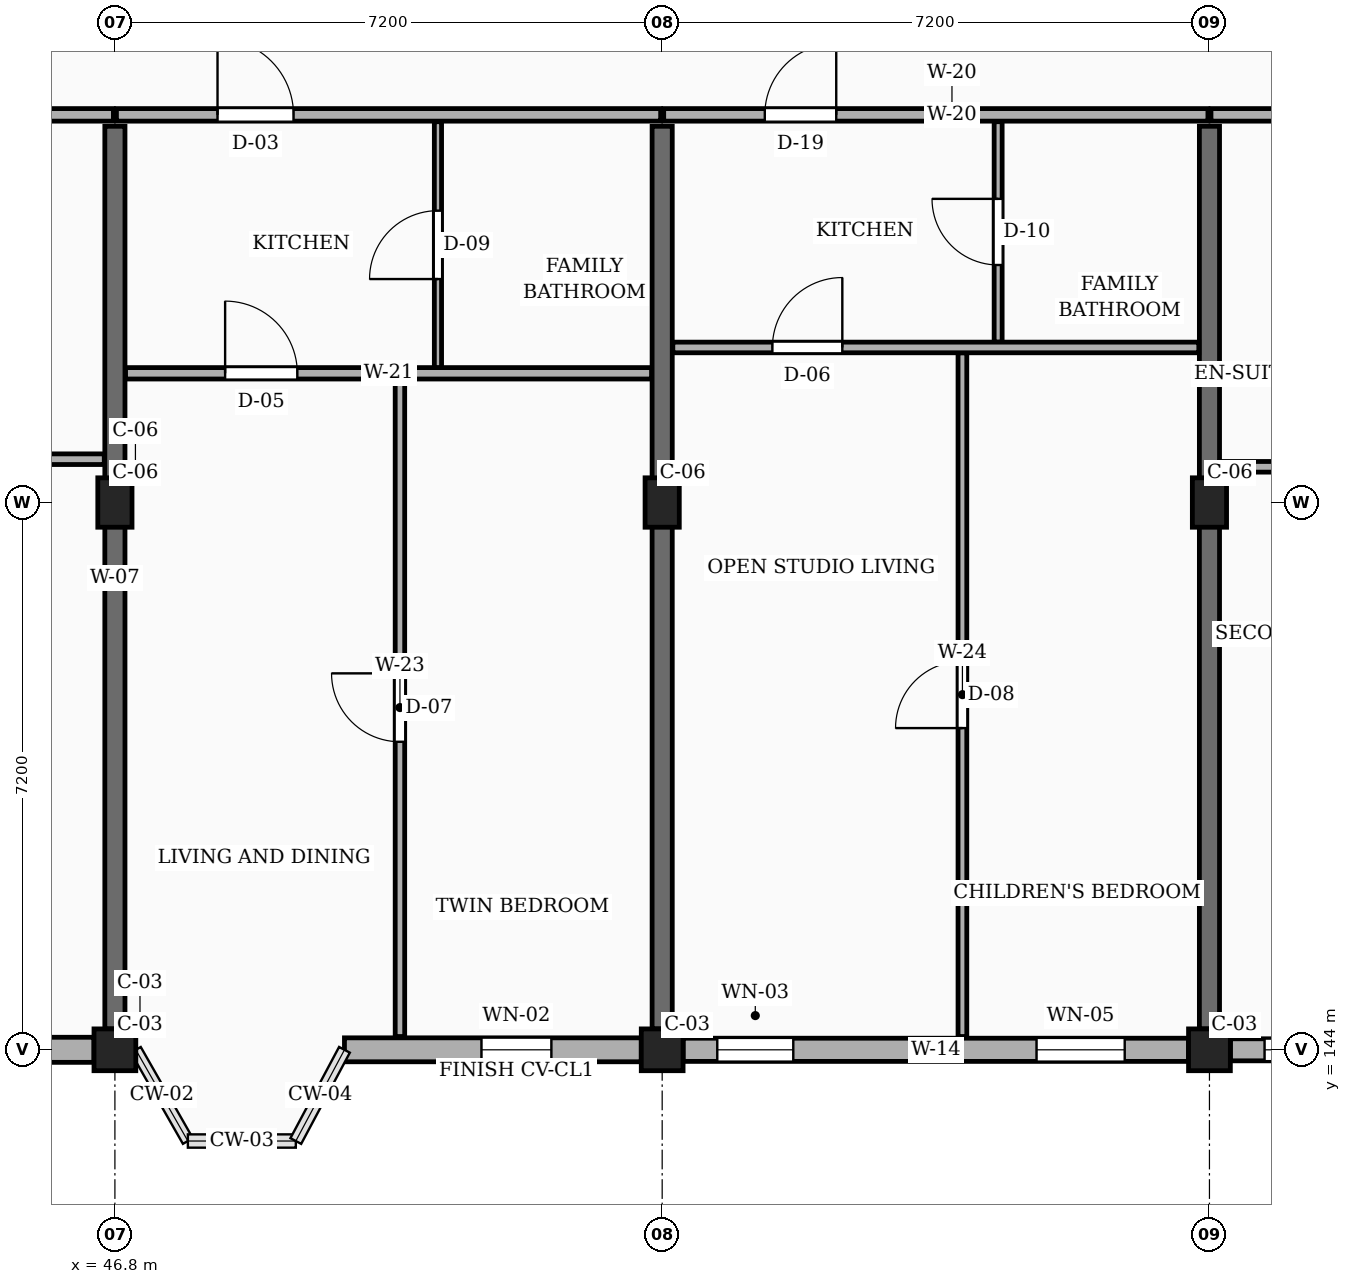
"""IFC4 building model, lengths in metres.
Left out: names, types, materials, properties, quantities, classifications, styles, units other than length and angle.
Written with IfcOpenShell. Run it as: python <this file> out.ifc"""

import sys

from ifc_helpers import new_model, si_unit, direction, frame, frame_2d, origin, origin_2d, place, context, subcontext, project, spatial, rectangle, extrude, element, fill, save


model = new_model("IFC4")
c1 = context("Model", 3, precision=1e-05, world=origin(), true_north=direction((0.0, 1.0)))
c2 = subcontext(c1, "Body", "Model", "MODEL_VIEW")
j1 = project(units=[si_unit("LENGTHUNIT", "METRE"), si_unit("PLANEANGLEUNIT", "RADIAN")], contexts=[c1])
p1 = place(None, origin())
s1 = spatial("IfcSite", under=j1, at=p1, CompositionType="ELEMENT")
p2 = place(p1, origin())
s2 = spatial("IfcBuilding", under=s1, at=p2, CompositionType="ELEMENT")
p3 = place(p2, frame((0.0, 0.0, 10.8)))
s3 = spatial("IfcBuildingStorey", under=s2, at=p3, CompositionType="ELEMENT", Elevation=10.8)
p4 = place(p3, frame((46.8, 144.0, 0.0), z_axis=(0.0, 0.0, 1.0), x_axis=(1.0, 0.0, 0.0)))
e1 = element("IfcColumn", 1, at=p4, inside=s3, PredefinedType="COLUMN", context=c2, shape_type="SweptSolid", body=[
    extrude(rectangle(XDim=0.55, YDim=0.55, at=origin_2d()), origin(), (0.0, 0.0, 1.0), 3.15),
])
p5 = place(p3, frame((46.8, 151.2, 0.0), z_axis=(0.0, 0.0, 1.0), x_axis=(1.0, 0.0, 0.0)))
e2 = element("IfcColumn", 2, at=p5, inside=s3, PredefinedType="COLUMN", context=c2, shape_type="SweptSolid", body=[
    extrude(rectangle(XDim=0.45, YDim=0.65, at=origin_2d()), origin(), (0.0, 0.0, 1.0), 3.15),
])
p6 = place(p3, frame((54.0, 144.0, 0.0), z_axis=(0.0, 0.0, 1.0), x_axis=(1.0, 0.0, 0.0)))
e3 = element("IfcColumn", 3, at=p6, inside=s3, PredefinedType="COLUMN", context=c2, shape_type="SweptSolid", body=[
    extrude(rectangle(XDim=0.55, YDim=0.55, at=origin_2d()), origin(), (0.0, 0.0, 1.0), 3.15),
])
p7 = place(p3, frame((54.0, 151.2, 0.0), z_axis=(0.0, 0.0, 1.0), x_axis=(1.0, 0.0, 0.0)))
e4 = element("IfcColumn", 4, at=p7, inside=s3, PredefinedType="COLUMN", context=c2, shape_type="SweptSolid", body=[
    extrude(rectangle(XDim=0.45, YDim=0.65, at=origin_2d()), origin(), (0.0, 0.0, 1.0), 3.15),
])
p8 = place(p3, frame((61.2, 144.0, 0.0), z_axis=(0.0, 0.0, 1.0), x_axis=(1.0, 0.0, 0.0)))
e5 = element("IfcColumn", 5, at=p8, inside=s3, PredefinedType="COLUMN", context=c2, shape_type="SweptSolid", body=[
    extrude(rectangle(XDim=0.55, YDim=0.55, at=origin_2d()), origin(), (0.0, 0.0, 1.0), 3.15),
])
p9 = place(p3, frame((61.2, 151.2, 0.0), z_axis=(0.0, 0.0, 1.0), x_axis=(1.0, 0.0, 0.0)))
e6 = element("IfcColumn", 6, at=p9, inside=s3, PredefinedType="COLUMN", context=c2, shape_type="SweptSolid", body=[
    extrude(rectangle(XDim=0.45, YDim=0.65, at=origin_2d()), origin(), (0.0, 0.0, 1.0), 3.15),
])
for number, where, z_axis, x_axis in (
    (7, (46.8, 144.275, 0.0), (0.0, 0.0, 1.0), (0.0, 1.0, 0.0)),
    (8, (54.0, 144.275, 0.0), (0.0, 0.0, 1.0), (0.0, 1.0, 0.0)),
    (9, (61.2, 144.275, 0.0), (0.0, 0.0, 1.0), (0.0, 1.0, 0.0)),
):
    element("IfcWall", number, at=place(p3, frame(where, z_axis=z_axis, x_axis=x_axis)), inside=s3, PredefinedType="SOLIDWALL", context=c2, shape_type="SweptSolid", body=[
        extrude(rectangle(XDim=11.875, YDim=0.265, at=frame_2d((5.938, 0.0))), origin(), (0.0, 0.0, 1.0), 2.185),
    ])
p10 = place(p3, frame((39.875, 144.0, 0.0), z_axis=(0.0, 0.0, 1.0), x_axis=(1.0, 0.0, 0.0)))
e10 = element("IfcWall", 10, at=p10, inside=s3, PredefinedType="SOLIDWALL", context=c2, shape_type="SweptSolid", body=[
    extrude(rectangle(XDim=6.65, YDim=0.33, at=frame_2d((3.325, 0.0))), origin(), (0.0, 0.0, 1.0), 2.455),
])
p11 = place(p10, frame((0.45, 0.0, 0.78)))
e11 = element("IfcOpeningElement", 11, at=p11, cuts=e10, PredefinedType="OPENING", context=c2, shape_type="SweptSolid", body=[
    extrude(rectangle(XDim=1.45, YDim=1.44, at=frame_2d((0.725, 0.72))), frame((0.0, 0.175, 0.0), z_axis=(0.0, -1.0, 0.0), x_axis=(1.0, 0.0, 0.0)), (0.0, 0.0, 1.0), 0.35),
])
p12 = place(p10, frame((4.65, 0.0, 0.78)))
e12 = element("IfcOpeningElement", 12, at=p12, cuts=e10, PredefinedType="OPENING", context=c2, shape_type="SweptSolid", body=[
    extrude(rectangle(XDim=0.92, YDim=1.15, at=frame_2d((0.46, 0.575))), frame((0.0, 0.175, 0.0), z_axis=(0.0, -1.0, 0.0), x_axis=(1.0, 0.0, 0.0)), (0.0, 0.0, 1.0), 0.35),
])
p13 = place(p3, frame((49.82, 144.0, 0.0), z_axis=(0.0, 0.0, 1.0), x_axis=(1.0, 0.0, 0.0)))
e13 = element("IfcWall", 13, at=p13, inside=s3, PredefinedType="SOLIDWALL", context=c2, shape_type="SweptSolid", body=[
    extrude(rectangle(XDim=3.905, YDim=0.315, at=frame_2d((1.953, 0.0))), origin(), (0.0, 0.0, 1.0), 2.455),
])
p14 = place(p13, frame((1.802, 0.0, 0.78)))
e14 = element("IfcOpeningElement", 14, at=p14, cuts=e13, PredefinedType="OPENING", context=c2, shape_type="SweptSolid", body=[
    extrude(rectangle(XDim=0.92, YDim=1.15, at=frame_2d((0.46, 0.575))), frame((0.0, 0.167, 0.0), z_axis=(0.0, -1.0, 0.0), x_axis=(1.0, 0.0, 0.0)), (0.0, 0.0, 1.0), 0.335),
])
p15 = place(p3, frame((54.275, 144.0, 0.0), z_axis=(0.0, 0.0, 1.0), x_axis=(1.0, 0.0, 0.0)))
e15 = element("IfcWall", 15, at=p15, inside=s3, PredefinedType="SOLIDWALL", context=c2, shape_type="SweptSolid", body=[
    extrude(rectangle(XDim=6.65, YDim=0.305, at=frame_2d((3.325, 0.0))), origin(), (0.0, 0.0, 1.0), 2.455),
])
p16 = place(p15, frame((0.45, 0.0, 0.78)))
e16 = element("IfcOpeningElement", 16, at=p16, cuts=e15, PredefinedType="OPENING", context=c2, shape_type="SweptSolid", body=[
    extrude(rectangle(XDim=1.0, YDim=1.15, at=frame_2d((0.5, 0.575))), frame((0.0, 0.163, 0.0), z_axis=(0.0, -1.0, 0.0), x_axis=(1.0, 0.0, 0.0)), (0.0, 0.0, 1.0), 0.325),
])
p17 = place(p15, frame((4.65, 0.0, 0.78)))
e17 = element("IfcOpeningElement", 17, at=p17, cuts=e15, PredefinedType="OPENING", context=c2, shape_type="SweptSolid", body=[
    extrude(rectangle(XDim=1.16, YDim=1.15, at=frame_2d((0.58, 0.575))), frame((0.0, 0.163, 0.0), z_axis=(0.0, -1.0, 0.0), x_axis=(1.0, 0.0, 0.0)), (0.0, 0.0, 1.0), 0.325),
])
p18 = place(p3, frame((61.475, 144.0, 0.0), z_axis=(0.0, 0.0, 1.0), x_axis=(1.0, 0.0, 0.0)))
e18 = element("IfcWall", 18, at=p18, inside=s3, PredefinedType="SOLIDWALL", context=c2, shape_type="SweptSolid", body=[
    extrude(rectangle(XDim=6.65, YDim=0.29, at=frame_2d((3.325, 0.0))), origin(), (0.0, 0.0, 1.0), 2.455),
])
p19 = place(p18, frame((0.45, 0.0, 0.78)))
e19 = element("IfcOpeningElement", 19, at=p19, cuts=e18, PredefinedType="OPENING", context=c2, shape_type="SweptSolid", body=[
    extrude(rectangle(XDim=1.16, YDim=1.15, at=frame_2d((0.58, 0.575))), frame((0.0, 0.155, 0.0), z_axis=(0.0, -1.0, 0.0), x_axis=(1.0, 0.0, 0.0)), (0.0, 0.0, 1.0), 0.31),
])
p20 = place(p18, frame((4.65, 0.0, 0.78)))
e20 = element("IfcOpeningElement", 20, at=p20, cuts=e18, PredefinedType="OPENING", context=c2, shape_type="SweptSolid", body=[
    extrude(rectangle(XDim=1.32, YDim=1.15, at=frame_2d((0.66, 0.575))), frame((0.0, 0.155, 0.0), z_axis=(0.0, -1.0, 0.0), x_axis=(1.0, 0.0, 0.0)), (0.0, 0.0, 1.0), 0.31),
])
p21 = place(p3, frame((39.62, 156.3, 0.0), z_axis=(0.0, 0.0, 1.0), x_axis=(1.0, 0.0, 0.0)))
e21 = element("IfcWall", 21, at=p21, inside=s3, PredefinedType="PARTITIONING", context=c2, shape_type="SweptSolid", body=[
    extrude(rectangle(XDim=7.16, YDim=0.165, at=frame_2d((3.58, 0.0))), origin(), (0.0, 0.0, 1.0), 2.32),
])
p22 = place(p21, frame((4.78, 0.0, 0.0)))
e22 = element("IfcOpeningElement", 22, at=p22, cuts=e21, PredefinedType="OPENING", context=c2, shape_type="SweptSolid", body=[
    extrude(rectangle(XDim=1.14, YDim=2.18, at=frame_2d((0.57, 1.09))), frame((0.0, 0.093, 0.0), z_axis=(0.0, -1.0, 0.0), x_axis=(1.0, 0.0, 0.0)), (0.0, 0.0, 1.0), 0.185),
])
p23 = place(p3, frame((46.82, 156.3, 0.0), z_axis=(0.0, 0.0, 1.0), x_axis=(1.0, 0.0, 0.0)))
e23 = element("IfcWall", 23, at=p23, inside=s3, PredefinedType="PARTITIONING", context=c2, shape_type="SweptSolid", body=[
    extrude(rectangle(XDim=7.16, YDim=0.165, at=frame_2d((3.58, 0.0))), origin(), (0.0, 0.0, 1.0), 2.32),
])
p24 = place(p23, frame((1.33, 0.0, 0.0)))
e24 = element("IfcOpeningElement", 24, at=p24, cuts=e23, PredefinedType="OPENING", context=c2, shape_type="SweptSolid", body=[
    extrude(rectangle(XDim=1.0, YDim=2.15, at=frame_2d((0.5, 1.075))), frame((0.0, 0.093, 0.0), z_axis=(0.0, -1.0, 0.0), x_axis=(1.0, 0.0, 0.0)), (0.0, 0.0, 1.0), 0.185),
])
p25 = place(p3, frame((54.02, 156.3, 0.0), z_axis=(0.0, 0.0, 1.0), x_axis=(1.0, 0.0, 0.0)))
e25 = element("IfcWall", 25, at=p25, inside=s3, PredefinedType="PARTITIONING", context=c2, shape_type="SweptSolid", body=[
    extrude(rectangle(XDim=7.16, YDim=0.165, at=frame_2d((3.58, 0.0))), origin(), (0.0, 0.0, 1.0), 2.32),
])
p26 = place(p25, frame((1.33, 0.0, 0.0)))
e26 = element("IfcOpeningElement", 26, at=p26, cuts=e25, PredefinedType="OPENING", context=c2, shape_type="SweptSolid", body=[
    extrude(rectangle(XDim=0.94, YDim=2.12, at=frame_2d((0.47, 1.06))), frame((0.0, 0.093, 0.0), z_axis=(0.0, -1.0, 0.0), x_axis=(1.0, 0.0, 0.0)), (0.0, 0.0, 1.0), 0.185),
])
p27 = place(p3, frame((61.22, 156.3, 0.0), z_axis=(0.0, 0.0, 1.0), x_axis=(1.0, 0.0, 0.0)))
e27 = element("IfcWall", 27, at=p27, inside=s3, PredefinedType="PARTITIONING", context=c2, shape_type="SweptSolid", body=[
    extrude(rectangle(XDim=7.16, YDim=0.165, at=frame_2d((3.58, 0.0))), origin(), (0.0, 0.0, 1.0), 2.32),
])
p28 = place(p27, frame((4.78, 0.0, 0.0)))
e28 = element("IfcOpeningElement", 28, at=p28, cuts=e27, PredefinedType="OPENING", context=c2, shape_type="SweptSolid", body=[
    extrude(rectangle(XDim=1.14, YDim=2.18, at=frame_2d((0.57, 1.09))), frame((0.0, 0.093, 0.0), z_axis=(0.0, -1.0, 0.0), x_axis=(1.0, 0.0, 0.0)), (0.0, 0.0, 1.0), 0.185),
])
p29 = place(p3, frame((39.74, 151.77, 0.0), z_axis=(0.0, 0.0, 1.0), x_axis=(1.0, 0.0, 0.0)))
e29 = element("IfcWall", 29, at=p29, inside=s3, PredefinedType="PARTITIONING", context=c2, shape_type="SweptSolid", body=[
    extrude(rectangle(XDim=6.92, YDim=0.14, at=frame_2d((3.46, 0.0))), origin(), (0.0, 0.0, 1.0), 2.32),
])
p30 = place(p29, frame((4.66, 0.0, 0.0)))
e30 = element("IfcOpeningElement", 30, at=p30, cuts=e29, PredefinedType="OPENING", context=c2, shape_type="SweptSolid", body=[
    extrude(rectangle(XDim=0.92, YDim=2.1, at=frame_2d((0.46, 1.05))), frame((0.0, 0.08, 0.0), z_axis=(0.0, -1.0, 0.0), x_axis=(1.0, 0.0, 0.0)), (0.0, 0.0, 1.0), 0.16),
])
p31 = place(p3, frame((50.55, 144.175, 0.0), z_axis=(0.0, 0.0, 1.0), x_axis=(0.0, 1.0, 0.0)))
e31 = element("IfcWall", 31, at=p31, inside=s3, PredefinedType="PARTITIONING", context=c2, shape_type="SweptSolid", body=[
    extrude(rectangle(XDim=8.655, YDim=0.125, at=frame_2d((4.328, 0.0))), origin(), (0.0, 0.0, 1.0), 2.32),
])
p32 = place(p31, frame((3.877, 0.0, 0.0)))
e32 = element("IfcOpeningElement", 32, at=p32, cuts=e31, PredefinedType="OPENING", context=c2, shape_type="SweptSolid", body=[
    extrude(rectangle(XDim=0.9, YDim=2.1, at=frame_2d((0.45, 1.05))), frame((0.0, 0.073, 0.0), z_axis=(0.0, -1.0, 0.0), x_axis=(1.0, 0.0, 0.0)), (0.0, 0.0, 1.0), 0.145),
])
p33 = place(p3, frame((51.05, 152.97, 0.0), z_axis=(0.0, 0.0, 1.0), x_axis=(0.0, 1.0, 0.0)))
e33 = element("IfcWall", 33, at=p33, inside=s3, PredefinedType="PARTITIONING", context=c2, shape_type="SweptSolid", body=[
    extrude(rectangle(XDim=3.24, YDim=0.095, at=frame_2d((1.62, 0.0))), origin(), (0.0, 0.0, 1.0), 2.32),
])
p34 = place(p33, frame((1.17, 0.0, 0.0)))
e34 = element("IfcOpeningElement", 34, at=p34, cuts=e33, PredefinedType="OPENING", context=c2, shape_type="SweptSolid", body=[
    extrude(rectangle(XDim=0.9, YDim=2.05, at=frame_2d((0.45, 1.025))), frame((0.0, 0.058, 0.0), z_axis=(0.0, -1.0, 0.0), x_axis=(1.0, 0.0, 0.0)), (0.0, 0.0, 1.0), 0.115),
])
p35 = place(p3, frame((46.94, 152.9, 0.0), z_axis=(0.0, 0.0, 1.0), x_axis=(1.0, 0.0, 0.0)))
e35 = element("IfcWall", 35, at=p35, inside=s3, PredefinedType="PARTITIONING", context=c2, shape_type="SweptSolid", body=[
    extrude(rectangle(XDim=6.92, YDim=0.15, at=frame_2d((3.46, 0.0))), origin(), (0.0, 0.0, 1.0), 2.32),
])
p36 = place(p35, frame((1.31, 0.0, 0.0)))
e36 = element("IfcOpeningElement", 36, at=p36, cuts=e35, PredefinedType="OPENING", context=c2, shape_type="SweptSolid", body=[
    extrude(rectangle(XDim=0.95, YDim=2.1, at=frame_2d((0.475, 1.05))), frame((0.0, 0.085, 0.0), z_axis=(0.0, -1.0, 0.0), x_axis=(1.0, 0.0, 0.0)), (0.0, 0.0, 1.0), 0.17),
])
p37 = place(p3, frame((57.95, 144.175, 0.0), z_axis=(0.0, 0.0, 1.0), x_axis=(0.0, 1.0, 0.0)))
e37 = element("IfcWall", 37, at=p37, inside=s3, PredefinedType="PARTITIONING", context=c2, shape_type="SweptSolid", body=[
    extrude(rectangle(XDim=8.995, YDim=0.115, at=frame_2d((4.498, 0.0))), origin(), (0.0, 0.0, 1.0), 2.32),
])
p38 = place(p37, frame((4.058, 0.0, 0.0)))
e38 = element("IfcOpeningElement", 38, at=p38, cuts=e37, PredefinedType="OPENING", context=c2, shape_type="SweptSolid", body=[
    extrude(rectangle(XDim=0.88, YDim=2.08, at=frame_2d((0.44, 1.04))), frame((0.0, 0.067, 0.0), z_axis=(0.0, -1.0, 0.0), x_axis=(1.0, 0.0, 0.0)), (0.0, 0.0, 1.0), 0.135),
])
p39 = place(p3, frame((58.42, 153.31, 0.0), z_axis=(0.0, 0.0, 1.0), x_axis=(0.0, 1.0, 0.0)))
e39 = element("IfcWall", 39, at=p39, inside=s3, PredefinedType="PARTITIONING", context=c2, shape_type="SweptSolid", body=[
    extrude(rectangle(XDim=2.9, YDim=0.105, at=frame_2d((1.45, 0.0))), origin(), (0.0, 0.0, 1.0), 2.32),
])
p40 = place(p39, frame((1.015, 0.0, 0.0)))
e40 = element("IfcOpeningElement", 40, at=p40, cuts=e39, PredefinedType="OPENING", context=c2, shape_type="SweptSolid", body=[
    extrude(rectangle(XDim=0.87, YDim=2.05, at=frame_2d((0.435, 1.025))), frame((0.0, 0.062, 0.0), z_axis=(0.0, -1.0, 0.0), x_axis=(1.0, 0.0, 0.0)), (0.0, 0.0, 1.0), 0.125),
])
p41 = place(p3, frame((54.14, 153.24, 0.0), z_axis=(0.0, 0.0, 1.0), x_axis=(1.0, 0.0, 0.0)))
e41 = element("IfcWall", 41, at=p41, inside=s3, PredefinedType="PARTITIONING", context=c2, shape_type="SweptSolid", body=[
    extrude(rectangle(XDim=6.92, YDim=0.14, at=frame_2d((3.46, 0.0))), origin(), (0.0, 0.0, 1.0), 2.32),
])
p42 = place(p41, frame((1.31, 0.0, 0.0)))
e42 = element("IfcOpeningElement", 42, at=p42, cuts=e41, PredefinedType="OPENING", context=c2, shape_type="SweptSolid", body=[
    extrude(rectangle(XDim=0.92, YDim=2.1, at=frame_2d((0.46, 1.05))), frame((0.0, 0.08, 0.0), z_axis=(0.0, -1.0, 0.0), x_axis=(1.0, 0.0, 0.0)), (0.0, 0.0, 1.0), 0.16),
])
p43 = place(p3, frame((61.34, 151.67, 0.0), z_axis=(0.0, 0.0, 1.0), x_axis=(1.0, 0.0, 0.0)))
e43 = element("IfcWall", 43, at=p43, inside=s3, PredefinedType="PARTITIONING", context=c2, shape_type="SweptSolid", body=[
    extrude(rectangle(XDim=6.92, YDim=0.14, at=frame_2d((3.46, 0.0))), origin(), (0.0, 0.0, 1.0), 2.32),
])
p44 = place(p43, frame((4.66, 0.0, 0.0)))
e44 = element("IfcOpeningElement", 44, at=p44, cuts=e43, PredefinedType="OPENING", context=c2, shape_type="SweptSolid", body=[
    extrude(rectangle(XDim=0.95, YDim=2.1, at=frame_2d((0.475, 1.05))), frame((0.0, 0.08, 0.0), z_axis=(0.0, -1.0, 0.0), x_axis=(1.0, 0.0, 0.0)), (0.0, 0.0, 1.0), 0.16),
])
p45 = place(p14, origin())
e45 = element("IfcWindow", 45, at=p45, inside=s3, PartitioningType="SINGLE_PANEL", PredefinedType="WINDOW", context=c2, shape_type="SweptSolid", body=[
    extrude(rectangle(XDim=0.92, YDim=1.15, at=frame_2d((0.46, 0.575))), frame((0.0, 0.03, 0.0), z_axis=(0.0, -1.0, 0.0), x_axis=(1.0, 0.0, 0.0)), (0.0, 0.0, 1.0), 0.06),
])
fill(e14, e45)
p46 = place(p16, origin())
e46 = element("IfcWindow", 46, at=p46, inside=s3, PartitioningType="SINGLE_PANEL", PredefinedType="WINDOW", context=c2, shape_type="SweptSolid", body=[
    extrude(rectangle(XDim=1.0, YDim=1.15, at=frame_2d((0.5, 0.575))), frame((0.0, 0.03, 0.0), z_axis=(0.0, -1.0, 0.0), x_axis=(1.0, 0.0, 0.0)), (0.0, 0.0, 1.0), 0.06),
])
fill(e16, e46)
p47 = place(p17, origin())
e47 = element("IfcWindow", 47, at=p47, inside=s3, PartitioningType="SINGLE_PANEL", PredefinedType="WINDOW", context=c2, shape_type="SweptSolid", body=[
    extrude(rectangle(XDim=1.16, YDim=1.15, at=frame_2d((0.58, 0.575))), frame((0.0, 0.03, 0.0), z_axis=(0.0, -1.0, 0.0), x_axis=(1.0, 0.0, 0.0)), (0.0, 0.0, 1.0), 0.06),
])
fill(e17, e47)
p48 = place(p19, origin())
e48 = element("IfcWindow", 48, at=p48, inside=s3, PartitioningType="SINGLE_PANEL", PredefinedType="WINDOW", context=c2, shape_type="SweptSolid", body=[
    extrude(rectangle(XDim=1.16, YDim=1.15, at=frame_2d((0.58, 0.575))), frame((0.0, 0.03, 0.0), z_axis=(0.0, -1.0, 0.0), x_axis=(1.0, 0.0, 0.0)), (0.0, 0.0, 1.0), 0.06),
])
fill(e19, e48)
p49 = place(p24, origin())
e49 = element("IfcDoor", 49, at=p49, inside=s3, OperationType="SINGLE_SWING_LEFT", PredefinedType="DOOR", context=c2, shape_type="SweptSolid", body=[
    extrude(rectangle(XDim=1.0, YDim=2.15, at=frame_2d((0.5, 1.075))), frame((0.0, 0.025, 0.0), z_axis=(0.0, -1.0, 0.0), x_axis=(1.0, 0.0, 0.0)), (0.0, 0.0, 1.0), 0.05),
])
fill(e24, e49)
p50 = place(p26, origin())
e50 = element("IfcDoor", 50, at=p50, inside=s3, OperationType="SINGLE_SWING_RIGHT", PredefinedType="DOOR", context=c2, shape_type="SweptSolid", body=[
    extrude(rectangle(XDim=0.94, YDim=2.12, at=frame_2d((0.47, 1.06))), frame((0.0, 0.025, 0.0), z_axis=(0.0, -1.0, 0.0), x_axis=(1.0, 0.0, 0.0)), (0.0, 0.0, 1.0), 0.05),
])
fill(e26, e50)
p51 = place(p32, origin())
e51 = element("IfcDoor", 51, at=p51, inside=s3, OperationType="SINGLE_SWING_RIGHT", PredefinedType="DOOR", context=c2, shape_type="SweptSolid", body=[
    extrude(rectangle(XDim=0.9, YDim=2.1, at=frame_2d((0.45, 1.05))), frame((0.0, 0.025, 0.0), z_axis=(0.0, -1.0, 0.0), x_axis=(1.0, 0.0, 0.0)), (0.0, 0.0, 1.0), 0.05),
])
fill(e32, e51)
p52 = place(p34, origin())
e52 = element("IfcDoor", 52, at=p52, inside=s3, OperationType="SINGLE_SWING_LEFT", PredefinedType="DOOR", context=c2, shape_type="SweptSolid", body=[
    extrude(rectangle(XDim=0.9, YDim=2.05, at=frame_2d((0.45, 1.025))), frame((0.0, 0.025, 0.0), z_axis=(0.0, -1.0, 0.0), x_axis=(1.0, 0.0, 0.0)), (0.0, 0.0, 1.0), 0.05),
])
fill(e34, e52)
p53 = place(p36, origin())
e53 = element("IfcDoor", 53, at=p53, inside=s3, OperationType="SINGLE_SWING_LEFT", PredefinedType="DOOR", context=c2, shape_type="SweptSolid", body=[
    extrude(rectangle(XDim=0.95, YDim=2.1, at=frame_2d((0.475, 1.05))), frame((0.0, 0.025, 0.0), z_axis=(0.0, -1.0, 0.0), x_axis=(1.0, 0.0, 0.0)), (0.0, 0.0, 1.0), 0.05),
])
fill(e36, e53)
p54 = place(p38, origin())
e54 = element("IfcDoor", 54, at=p54, inside=s3, OperationType="SINGLE_SWING_LEFT", PredefinedType="DOOR", context=c2, shape_type="SweptSolid", body=[
    extrude(rectangle(XDim=0.88, YDim=2.08, at=frame_2d((0.44, 1.04))), frame((0.0, 0.025, 0.0), z_axis=(0.0, -1.0, 0.0), x_axis=(1.0, 0.0, 0.0)), (0.0, 0.0, 1.0), 0.05),
])
fill(e38, e54)
p55 = place(p40, origin())
e55 = element("IfcDoor", 55, at=p55, inside=s3, OperationType="SINGLE_SWING_RIGHT", PredefinedType="DOOR", context=c2, shape_type="SweptSolid", body=[
    extrude(rectangle(XDim=0.87, YDim=2.05, at=frame_2d((0.435, 1.025))), frame((0.0, 0.025, 0.0), z_axis=(0.0, -1.0, 0.0), x_axis=(1.0, 0.0, 0.0)), (0.0, 0.0, 1.0), 0.05),
])
fill(e40, e55)
p56 = place(p42, origin())
e56 = element("IfcDoor", 56, at=p56, inside=s3, OperationType="SINGLE_SWING_RIGHT", PredefinedType="DOOR", context=c2, shape_type="SweptSolid", body=[
    extrude(rectangle(XDim=0.92, YDim=2.1, at=frame_2d((0.46, 1.05))), frame((0.0, 0.025, 0.0), z_axis=(0.0, -1.0, 0.0), x_axis=(1.0, 0.0, 0.0)), (0.0, 0.0, 1.0), 0.05),
])
fill(e42, e56)
save(model, sys.argv[1])
